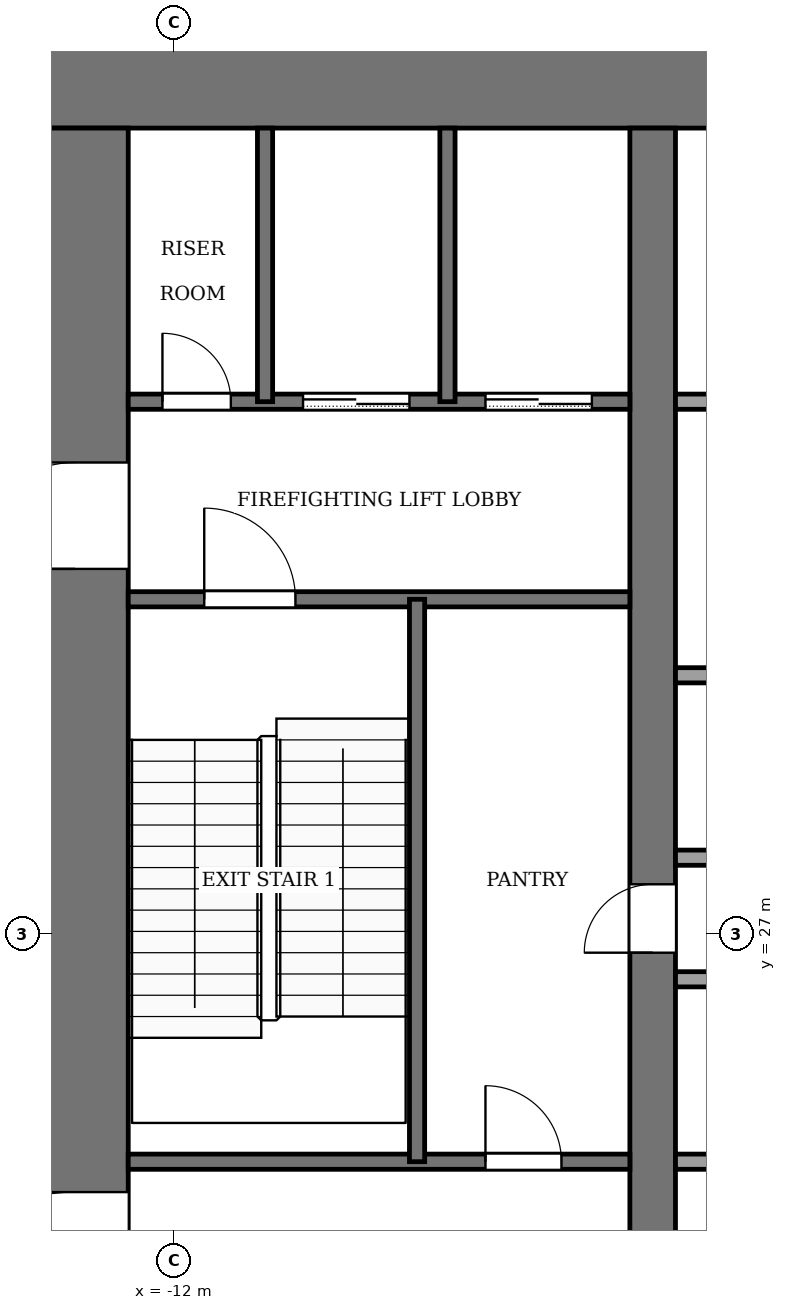
"""IFC4 building model, lengths in metres.
Left out: names, types, materials, properties, quantities, classifications, styles, units other than length and angle.
Written with IfcOpenShell. Run it as: python <this file> out.ifc"""

import sys

from ifc_helpers import new_model, si_unit, direction, frame, frame_2d, origin, place, context, subcontext, project, spatial, rectangle, extrude, element, fill, save


model = new_model("IFC4")
c1 = context("Model", 3, precision=1e-05, world=origin(), true_north=direction((0.0, 1.0)))
c2 = subcontext(c1, "Body", "Model", "MODEL_VIEW")
j1 = project(units=[si_unit("LENGTHUNIT", "METRE"), si_unit("PLANEANGLEUNIT", "RADIAN")], contexts=[c1])
p1 = place(None, origin())
s1 = spatial("IfcSite", under=j1, at=p1, CompositionType="ELEMENT")
p2 = place(p1, origin())
s2 = spatial("IfcBuilding", under=s1, at=p2, CompositionType="ELEMENT")
p3 = place(p2, frame((0.0, 0.0, 9.0)))
s3 = spatial("IfcBuildingStorey", under=s2, at=p3, CompositionType="ELEMENT", Elevation=9.0)
p4 = place(p3, frame((-14.0, 38.3, -0.13), z_axis=(0.0, 0.0, 1.0), x_axis=(1.0, 0.0, 0.0)))
e1 = element("IfcWall", 1, at=p4, inside=s3, PredefinedType="SHEAR", context=c2, shape_type="SweptSolid", body=[
    extrude(rectangle(XDim=28.0, YDim=1.4, at=frame_2d((14.0, 0.0))), origin(), (0.0, 0.0, 1.0), 5.0),
])
p5 = place(p3, frame((-13.3, 18.4, -0.13), z_axis=(0.0, 0.0, 1.0), x_axis=(0.0, 1.0, 0.0)))
e2 = element("IfcWall", 2, at=p5, inside=s3, PredefinedType="SHEAR", context=c2, shape_type="SweptSolid", body=[
    extrude(rectangle(XDim=19.2, YDim=1.4, at=frame_2d((9.6, 0.0))), origin(), (0.0, 0.0, 1.0), 5.0),
])
p6 = place(p5, frame((2.8, 0.0, 0.13)))
e3 = element("IfcOpeningElement", 3, at=p6, cuts=e2, PredefinedType="OPENING", context=c2, shape_type="SweptSolid", body=[
    extrude(rectangle(XDim=2.4, YDim=2.4, at=frame_2d((1.2, 1.2))), frame((0.0, 0.71, 0.0), z_axis=(0.0, -1.0, 0.0), x_axis=(1.0, 0.0, 0.0)), (0.0, 0.0, 1.0), 1.42),
])
p7 = place(p5, frame((13.4, 0.0, 0.13)))
e4 = element("IfcOpeningElement", 4, at=p7, cuts=e2, PredefinedType="OPENING", context=c2, shape_type="SweptSolid", body=[
    extrude(rectangle(XDim=1.4, YDim=2.2, at=frame_2d((0.7, 1.1))), frame((0.0, 0.71, 0.0), z_axis=(0.0, -1.0, 0.0), x_axis=(1.0, 0.0, 0.0)), (0.0, 0.0, 1.0), 1.42),
])
p8 = place(p3, frame((-5.7, 18.4, -0.13), z_axis=(0.0, 0.0, 1.0), x_axis=(0.0, 1.0, 0.0)))
e5 = element("IfcWall", 5, at=p8, inside=s3, PredefinedType="SHEAR", context=c2, shape_type="SweptSolid", body=[
    extrude(rectangle(XDim=19.2, YDim=0.6, at=frame_2d((9.6, 0.0))), origin(), (0.0, 0.0, 1.0), 5.0),
])
p9 = place(p8, frame((8.35, 0.0, 0.13)))
e6 = element("IfcOpeningElement", 6, at=p9, cuts=e5, PredefinedType="OPENING", context=c2, shape_type="SweptSolid", body=[
    extrude(rectangle(XDim=0.9, YDim=2.1, at=frame_2d((0.45, 1.05))), frame((0.0, 0.31, 0.0), z_axis=(0.0, -1.0, 0.0), x_axis=(1.0, 0.0, 0.0)), (0.0, 0.0, 1.0), 0.62),
])
p10 = place(p3, frame((-12.6, 24.0, 0.0), z_axis=(0.0, 0.0, 1.0), x_axis=(1.0, 0.0, 0.0)))
e7 = element("IfcWall", 7, at=p10, inside=s3, PredefinedType="PARTITIONING", context=c2, shape_type="SweptSolid", body=[
    extrude(rectangle(XDim=6.6, YDim=0.2, at=frame_2d((3.3, 0.0))), origin(), (0.0, 0.0, 1.0), 4.87),
])
p11 = place(p10, frame((4.7, 0.0, 0.0)))
e8 = element("IfcOpeningElement", 8, at=p11, cuts=e7, PredefinedType="OPENING", context=c2, shape_type="SweptSolid", body=[
    extrude(rectangle(XDim=1.0, YDim=2.1, at=frame_2d((0.5, 1.05))), frame((0.0, 0.11, 0.0), z_axis=(0.0, -1.0, 0.0), x_axis=(1.0, 0.0, 0.0)), (0.0, 0.0, 1.0), 0.22),
])
p12 = place(p3, frame((-5.4, 24.0, 0.0), z_axis=(0.0, 0.0, 1.0), x_axis=(1.0, 0.0, 0.0)))
e9 = element("IfcWall", 9, at=p12, inside=s3, PredefinedType="PARTITIONING", context=c2, shape_type="SweptSolid", body=[
    extrude(rectangle(XDim=10.8, YDim=0.2, at=frame_2d((5.4, 0.0))), origin(), (0.0, 0.0, 1.0), 4.87),
])
p13 = place(p12, frame((0.75, 0.0, 0.0)))
e10 = element("IfcOpeningElement", 10, at=p13, cuts=e9, PredefinedType="OPENING", context=c2, shape_type="SweptSolid", body=[
    extrude(rectangle(XDim=1.2, YDim=2.2, at=frame_2d((0.6, 1.1))), frame((0.0, 0.11, 0.0), z_axis=(0.0, -1.0, 0.0), x_axis=(1.0, 0.0, 0.0)), (0.0, 0.0, 1.0), 0.22),
])
p14 = place(p12, frame((3.45, 0.0, 0.0)))
e11 = element("IfcOpeningElement", 11, at=p14, cuts=e9, PredefinedType="OPENING", context=c2, shape_type="SweptSolid", body=[
    extrude(rectangle(XDim=1.2, YDim=2.2, at=frame_2d((0.6, 1.1))), frame((0.0, 0.11, 0.0), z_axis=(0.0, -1.0, 0.0), x_axis=(1.0, 0.0, 0.0)), (0.0, 0.0, 1.0), 0.22),
])
p15 = place(p12, frame((6.15, 0.0, 0.0)))
e12 = element("IfcOpeningElement", 12, at=p15, cuts=e9, PredefinedType="OPENING", context=c2, shape_type="SweptSolid", body=[
    extrude(rectangle(XDim=1.2, YDim=2.2, at=frame_2d((0.6, 1.1))), frame((0.0, 0.11, 0.0), z_axis=(0.0, -1.0, 0.0), x_axis=(1.0, 0.0, 0.0)), (0.0, 0.0, 1.0), 0.22),
])
p16 = place(p12, frame((8.85, 0.0, 0.0)))
e13 = element("IfcOpeningElement", 13, at=p16, cuts=e9, PredefinedType="OPENING", context=c2, shape_type="SweptSolid", body=[
    extrude(rectangle(XDim=1.2, YDim=2.2, at=frame_2d((0.6, 1.1))), frame((0.0, 0.11, 0.0), z_axis=(0.0, -1.0, 0.0), x_axis=(1.0, 0.0, 0.0)), (0.0, 0.0, 1.0), 0.22),
])
for number, where, z_axis, x_axis in (
    (14, (-5.4, 26.4, 0.0), (0.0, 0.0, 1.0), (1.0, 0.0, 0.0)),
    (15, (-5.4, 28.0, 0.0), (0.0, 0.0, 1.0), (1.0, 0.0, 0.0)),
    (16, (-5.4, 30.4, 0.0), (0.0, 0.0, 1.0), (1.0, 0.0, 0.0)),
):
    element("IfcWall", number, at=place(p3, frame(where, z_axis=z_axis, x_axis=x_axis)), inside=s3, PredefinedType="PARTITIONING", context=c2, shape_type="SweptSolid", body=[
        extrude(rectangle(XDim=10.8, YDim=0.2, at=frame_2d((5.4, 0.0))), origin(), (0.0, 0.0, 1.0), 4.87),
    ])
p17 = place(p3, frame((-12.6, 31.4, 0.0), z_axis=(0.0, 0.0, 1.0), x_axis=(1.0, 0.0, 0.0)))
e17 = element("IfcWall", 17, at=p17, inside=s3, PredefinedType="PARTITIONING", context=c2, shape_type="SweptSolid", body=[
    extrude(rectangle(XDim=6.6, YDim=0.2, at=frame_2d((3.3, 0.0))), origin(), (0.0, 0.0, 1.0), 4.87),
])
p18 = place(p17, frame((1.0, 0.0, 0.0)))
e18 = element("IfcOpeningElement", 18, at=p18, cuts=e17, PredefinedType="OPENING", context=c2, shape_type="SweptSolid", body=[
    extrude(rectangle(XDim=1.2, YDim=2.2, at=frame_2d((0.6, 1.1))), frame((0.0, 0.11, 0.0), z_axis=(0.0, -1.0, 0.0), x_axis=(1.0, 0.0, 0.0)), (0.0, 0.0, 1.0), 0.22),
])
p19 = place(p3, frame((-12.6, 34.0, 0.0), z_axis=(0.0, 0.0, 1.0), x_axis=(1.0, 0.0, 0.0)))
e19 = element("IfcWall", 19, at=p19, inside=s3, PredefinedType="PARTITIONING", context=c2, shape_type="SweptSolid", body=[
    extrude(rectangle(XDim=6.6, YDim=0.2, at=frame_2d((3.3, 0.0))), origin(), (0.0, 0.0, 1.0), 4.87),
])
p20 = place(p19, frame((4.7, 0.0, 0.0)))
e20 = element("IfcOpeningElement", 20, at=p20, cuts=e19, PredefinedType="OPENING", context=c2, shape_type="SweptSolid", body=[
    extrude(rectangle(XDim=1.4, YDim=2.2, at=frame_2d((0.7, 1.1))), frame((0.0, 0.11, 0.0), z_axis=(0.0, -1.0, 0.0), x_axis=(1.0, 0.0, 0.0)), (0.0, 0.0, 1.0), 0.22),
])
p21 = place(p19, frame((2.3, 0.0, 0.0)))
e21 = element("IfcOpeningElement", 21, at=p21, cuts=e19, PredefinedType="OPENING", context=c2, shape_type="SweptSolid", body=[
    extrude(rectangle(XDim=1.4, YDim=2.2, at=frame_2d((0.7, 1.1))), frame((0.0, 0.11, 0.0), z_axis=(0.0, -1.0, 0.0), x_axis=(1.0, 0.0, 0.0)), (0.0, 0.0, 1.0), 0.22),
])
p22 = place(p19, frame((0.45, 0.0, 0.0)))
e22 = element("IfcOpeningElement", 22, at=p22, cuts=e19, PredefinedType="OPENING", context=c2, shape_type="SweptSolid", body=[
    extrude(rectangle(XDim=0.9, YDim=2.1, at=frame_2d((0.45, 1.05))), frame((0.0, 0.11, 0.0), z_axis=(0.0, -1.0, 0.0), x_axis=(1.0, 0.0, 0.0)), (0.0, 0.0, 1.0), 0.22),
])
p23 = place(p3, frame((-5.4, 34.0, 0.0), z_axis=(0.0, 0.0, 1.0), x_axis=(1.0, 0.0, 0.0)))
e23 = element("IfcWall", 23, at=p23, inside=s3, PredefinedType="PARTITIONING", context=c2, shape_type="SweptSolid", body=[
    extrude(rectangle(XDim=10.8, YDim=0.2, at=frame_2d((5.4, 0.0))), origin(), (0.0, 0.0, 1.0), 4.87),
])
p24 = place(p23, frame((6.15, 0.0, 0.0)))
e24 = element("IfcOpeningElement", 24, at=p24, cuts=e23, PredefinedType="OPENING", context=c2, shape_type="SweptSolid", body=[
    extrude(rectangle(XDim=1.2, YDim=2.2, at=frame_2d((0.6, 1.1))), frame((0.0, 0.11, 0.0), z_axis=(0.0, -1.0, 0.0), x_axis=(1.0, 0.0, 0.0)), (0.0, 0.0, 1.0), 0.22),
])
p25 = place(p23, frame((8.95, 0.0, 0.0)))
e25 = element("IfcOpeningElement", 25, at=p25, cuts=e23, PredefinedType="OPENING", context=c2, shape_type="SweptSolid", body=[
    extrude(rectangle(XDim=1.0, YDim=2.1, at=frame_2d((0.5, 1.05))), frame((0.0, 0.11, 0.0), z_axis=(0.0, -1.0, 0.0), x_axis=(1.0, 0.0, 0.0)), (0.0, 0.0, 1.0), 0.22),
])
p26 = place(p3, frame((-10.8, 34.0, 0.0), z_axis=(0.0, 0.0, 1.0), x_axis=(0.0, 1.0, 0.0)))
e26 = element("IfcWall", 26, at=p26, inside=s3, PredefinedType="PARTITIONING", context=c2, shape_type="SweptSolid", body=[
    extrude(rectangle(XDim=3.6, YDim=0.2, at=frame_2d((1.8, 0.0))), origin(), (0.0, 0.0, 1.0), 4.87),
])
p27 = place(p3, frame((-8.8, 24.0, 0.0), z_axis=(0.0, 0.0, 1.0), x_axis=(0.0, 1.0, 0.0)))
e27 = element("IfcWall", 27, at=p27, inside=s3, PredefinedType="PARTITIONING", context=c2, shape_type="SweptSolid", body=[
    extrude(rectangle(XDim=7.4, YDim=0.2, at=frame_2d((3.7, 0.0))), origin(), (0.0, 0.0, 1.0), 4.87),
])
p28 = place(p3, frame((-8.4, 34.0, 0.0), z_axis=(0.0, 0.0, 1.0), x_axis=(0.0, 1.0, 0.0)))
e28 = element("IfcWall", 28, at=p28, inside=s3, PredefinedType="PARTITIONING", context=c2, shape_type="SweptSolid", body=[
    extrude(rectangle(XDim=3.6, YDim=0.2, at=frame_2d((1.8, 0.0))), origin(), (0.0, 0.0, 1.0), 4.87),
])
p29 = place(p20, origin())
e29 = element("IfcDoor", 29, at=p29, inside=s3, OperationType="SLIDING_TO_LEFT", PredefinedType="DOOR", context=c2, shape_type="SweptSolid", body=[
    extrude(rectangle(XDim=1.4, YDim=2.2, at=frame_2d((0.7, 1.1))), frame((0.0, 0.025, 0.0), z_axis=(0.0, -1.0, 0.0), x_axis=(1.0, 0.0, 0.0)), (0.0, 0.0, 1.0), 0.05),
])
fill(e20, e29)
p30 = place(p21, origin())
e30 = element("IfcDoor", 30, at=p30, inside=s3, OperationType="SLIDING_TO_LEFT", PredefinedType="DOOR", context=c2, shape_type="SweptSolid", body=[
    extrude(rectangle(XDim=1.4, YDim=2.2, at=frame_2d((0.7, 1.1))), frame((0.0, 0.025, 0.0), z_axis=(0.0, -1.0, 0.0), x_axis=(1.0, 0.0, 0.0)), (0.0, 0.0, 1.0), 0.05),
])
fill(e21, e30)
p31 = place(p22, origin())
e31 = element("IfcDoor", 31, at=p31, inside=s3, OperationType="SINGLE_SWING_RIGHT", PredefinedType="DOOR", context=c2, shape_type="SweptSolid", body=[
    extrude(rectangle(XDim=0.9, YDim=2.1, at=frame_2d((0.45, 1.05))), frame((0.0, 0.025, 0.0), z_axis=(0.0, -1.0, 0.0), x_axis=(1.0, 0.0, 0.0)), (0.0, 0.0, 1.0), 0.05),
])
fill(e22, e31)
p32 = place(p11, origin())
e32 = element("IfcDoor", 32, at=p32, inside=s3, OperationType="SINGLE_SWING_RIGHT", PredefinedType="DOOR", context=c2, shape_type="SweptSolid", body=[
    extrude(rectangle(XDim=1.0, YDim=2.1, at=frame_2d((0.5, 1.05))), frame((0.0, 0.025, 0.0), z_axis=(0.0, -1.0, 0.0), x_axis=(1.0, 0.0, 0.0)), (0.0, 0.0, 1.0), 0.05),
])
fill(e8, e32)
p33 = place(p9, origin())
e33 = element("IfcDoor", 33, at=p33, inside=s3, OperationType="SINGLE_SWING_RIGHT", PredefinedType="DOOR", context=c2, shape_type="SweptSolid", body=[
    extrude(rectangle(XDim=0.9, YDim=2.1, at=frame_2d((0.45, 1.05))), frame((0.0, 0.025, 0.0), z_axis=(0.0, -1.0, 0.0), x_axis=(1.0, 0.0, 0.0)), (0.0, 0.0, 1.0), 0.05),
])
fill(e6, e33)
p34 = place(p18, origin())
e34 = element("IfcDoor", 34, at=p34, inside=s3, OperationType="SINGLE_SWING_RIGHT", PredefinedType="DOOR", context=c2, shape_type="SweptSolid", body=[
    extrude(rectangle(XDim=1.2, YDim=2.2, at=frame_2d((0.6, 1.1))), frame((0.0, 0.025, 0.0), z_axis=(0.0, -1.0, 0.0), x_axis=(1.0, 0.0, 0.0)), (0.0, 0.0, 1.0), 0.05),
])
fill(e18, e34)
p35 = place(p6, origin())
e35 = element("IfcDoor", 35, at=p35, inside=s3, OperationType="DOUBLE_DOOR_SINGLE_SWING", PredefinedType="DOOR", context=c2, shape_type="SweptSolid", body=[
    extrude(rectangle(XDim=2.4, YDim=2.4, at=frame_2d((1.2, 1.2))), frame((0.0, 0.025, 0.0), z_axis=(0.0, -1.0, 0.0), x_axis=(1.0, 0.0, 0.0)), (0.0, 0.0, 1.0), 0.05),
])
fill(e3, e35)
p36 = place(p7, origin())
e36 = element("IfcDoor", 36, at=p36, inside=s3, OperationType="SINGLE_SWING_RIGHT", PredefinedType="DOOR", context=c2, shape_type="SweptSolid", body=[
    extrude(rectangle(XDim=1.4, YDim=2.2, at=frame_2d((0.7, 1.1))), frame((0.0, 0.025, 0.0), z_axis=(0.0, -1.0, 0.0), x_axis=(1.0, 0.0, 0.0)), (0.0, 0.0, 1.0), 0.05),
])
fill(e4, e36)
save(model, sys.argv[1])
